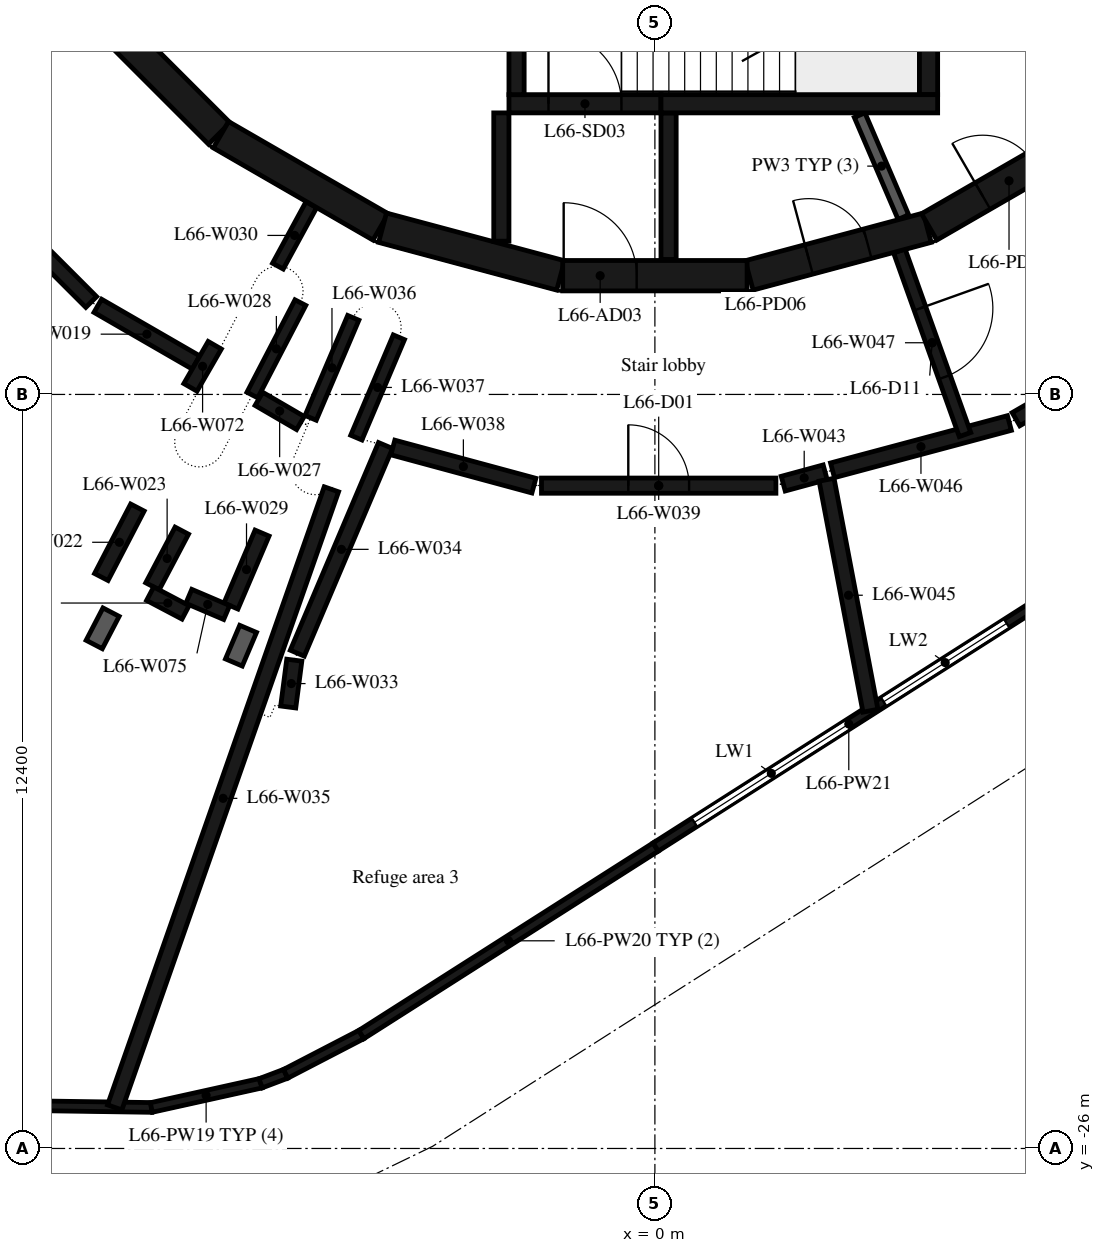
"""IFC4 building model, lengths in metres.
Left out: names, types, materials, properties, quantities, classifications, styles, units other than length and angle.
Written with IfcOpenShell. Run it as: python <this file> out.ifc"""

import sys

from ifc_helpers import new_model, si_unit, direction, frame, frame_2d, origin, place, context, subcontext, project, spatial, rectangle, extrude, element, fill, save


model = new_model("IFC4")
c1 = context("Model", 3, precision=1e-05, world=origin(), true_north=direction((0.0, 1.0)))
c2 = subcontext(c1, "Body", "Model", "MODEL_VIEW")
j1 = project(units=[si_unit("LENGTHUNIT", "METRE"), si_unit("PLANEANGLEUNIT", "RADIAN")], contexts=[c1])
p1 = place(None, origin())
s1 = spatial("IfcSite", under=j1, at=p1, CompositionType="ELEMENT")
p2 = place(p1, origin())
s2 = spatial("IfcBuilding", under=s1, at=p2, CompositionType="ELEMENT")
p3 = place(p2, frame((0.0, 0.0, 258.2)))
s3 = spatial("IfcBuildingStorey", under=s2, at=p3, CompositionType="ELEMENT", Elevation=258.2)
p4 = place(p3, frame((-10.12, -25.299, 0.0), z_axis=(0.0, 0.0, 1.0), x_axis=(0.999894413213, -0.014531428914, 0.0)))
e1 = element("IfcWall", 1, at=p4, inside=s3, PredefinedType="STANDARD", context=c2, shape_type="SweptSolid", body=[
    extrude(rectangle(XDim=1.848, YDim=0.16, at=frame_2d((0.924, 0.0))), origin(), (0.0, 0.0, 1.0), 4.75),
])
p5 = place(p3, frame((-8.281, -25.326, 0.0), z_axis=(0.0, 0.0, 1.0), x_axis=(0.976289627281, 0.216468389524, 0.0)))
e2 = element("IfcWall", 2, at=p5, inside=s3, PredefinedType="STANDARD", context=c2, shape_type="SweptSolid", body=[
    extrude(rectangle(XDim=1.846, YDim=0.16, at=frame_2d((0.923, 0.0))), origin(), (0.0, 0.0, 1.0), 4.75),
])
p6 = place(p3, frame((-6.484, -24.928, 0.0), z_axis=(0.0, 0.0, 1.0), x_axis=(0.93530111793, 0.353852820815, 0.0)))
e3 = element("IfcWall", 3, at=p6, inside=s3, PredefinedType="STANDARD", context=c2, shape_type="SweptSolid", body=[
    extrude(rectangle(XDim=0.441, YDim=0.16, at=frame_2d((0.22, 0.0))), origin(), (0.0, 0.0, 1.0), 4.75),
])
p7 = place(p3, frame((-6.072, -24.772, 0.0), z_axis=(0.0, 0.0, 1.0), x_axis=(0.887654565079, 0.460509905533, 0.0)))
e4 = element("IfcWall", 4, at=p7, inside=s3, PredefinedType="STANDARD", context=c2, shape_type="SweptSolid", body=[
    extrude(rectangle(XDim=1.405, YDim=0.16, at=frame_2d((0.702, 0.0))), origin(), (0.0, 0.0, 1.0), 4.75),
])
p8 = place(p3, frame((-4.828, -24.127, 0.0), z_axis=(0.0, 0.0, 1.0), x_axis=(0.843393436183, 0.537296484079, 0.0)))
e5 = element("IfcWall", 5, at=p8, inside=s3, PredefinedType="STANDARD", context=c2, shape_type="SweptSolid", body=[
    extrude(rectangle(XDim=5.74, YDim=0.16, at=frame_2d((2.87, 0.0))), origin(), (0.0, 0.0, 1.0), 4.75),
])
p9 = place(p3, frame((0.013, -21.043, 0.0), z_axis=(0.0, 0.0, 1.0), x_axis=(0.843393042763, 0.537297101629, 0.0)))
e6 = element("IfcWall", 6, at=p9, inside=s3, PredefinedType="STANDARD", context=c2, shape_type="SweptSolid", body=[
    extrude(rectangle(XDim=7.53, YDim=0.16, at=frame_2d((3.765, 0.0))), origin(), (0.0, 0.0, 1.0), 4.75),
])
p10 = place(p9, frame((0.755, 0.0, 1.0)))
e7 = element("IfcOpeningElement", 7, at=p10, cuts=e6, PredefinedType="OPENING", context=c2, shape_type="SweptSolid", body=[
    extrude(rectangle(XDim=3.0, YDim=2.2, at=frame_2d((1.5, 1.1))), frame((0.0, 0.09, 0.0), z_axis=(0.0, -1.0, 0.0), x_axis=(1.0, 0.0, 0.0)), (0.0, 0.0, 1.0), 0.18),
])
p11 = place(p9, frame((4.445, 0.0, 1.0)))
e8 = element("IfcOpeningElement", 8, at=p11, cuts=e6, PredefinedType="OPENING", context=c2, shape_type="SweptSolid", body=[
    extrude(rectangle(XDim=2.4, YDim=2.2, at=frame_2d((1.2, 1.1))), frame((0.0, 0.09, 0.0), z_axis=(0.0, -1.0, 0.0), x_axis=(1.0, 0.0, 0.0)), (0.0, 0.0, 1.0), 0.18),
])
p12 = place(p3, frame((1.55, -11.643, 0.0), z_axis=(0.0, 0.0, 1.0), x_axis=(0.965948410781, 0.258734743916, 0.0)))
e9 = element("IfcWall", 9, at=p12, inside=s3, PredefinedType="SHEAR", context=c2, shape_type="SweptSolid", body=[
    extrude(rectangle(XDim=3.033, YDim=0.5, at=frame_2d((1.516, 0.0))), origin(), (0.0, 0.0, 1.0), 4.75),
])
p13 = place(p12, frame((1.016, 0.0, 0.0)))
e10 = element("IfcOpeningElement", 10, at=p13, cuts=e9, PredefinedType="OPENING", context=c2, shape_type="SweptSolid", body=[
    extrude(rectangle(XDim=1.0, YDim=2.4, at=frame_2d((0.5, 1.2))), frame((0.0, 0.26, 0.0), z_axis=(0.0, -1.0, 0.0), x_axis=(1.0, 0.0, 0.0)), (0.0, 0.0, 1.0), 0.52),
])
p14 = place(p3, frame((4.51, -10.845, 0.0), z_axis=(0.0, 0.0, 1.0), x_axis=(0.865975092491, 0.500087131594, 0.0)))
e11 = element("IfcWall", 11, at=p14, inside=s3, PredefinedType="SHEAR", context=c2, shape_type="SweptSolid", body=[
    extrude(rectangle(XDim=3.033, YDim=0.5, at=frame_2d((1.516, 0.0))), origin(), (0.0, 0.0, 1.0), 4.75),
])
p15 = place(p14, frame((1.016, 0.0, 0.0)))
e12 = element("IfcOpeningElement", 12, at=p15, cuts=e11, PredefinedType="OPENING", context=c2, shape_type="SweptSolid", body=[
    extrude(rectangle(XDim=1.0, YDim=2.4, at=frame_2d((0.5, 1.2))), frame((0.0, 0.26, 0.0), z_axis=(0.0, -1.0, 0.0), x_axis=(1.0, 0.0, 0.0)), (0.0, 0.0, 1.0), 0.52),
])
p16 = place(p3, frame((-9.308, -7.164, 0.0), z_axis=(0.0, 0.0, 1.0), x_axis=(0.707106781187, -0.707106781187, 0.0)))
e13 = element("IfcWall", 13, at=p16, inside=s3, PredefinedType="SHEAR", context=c2, shape_type="SweptSolid", body=[
    extrude(rectangle(XDim=3.032, YDim=0.5, at=frame_2d((1.516, 0.0))), origin(), (0.0, 0.0, 1.0), 4.75),
])
for number, where, z_axis, x_axis in (
    (14, (-7.137, -9.329, 0.0), (0.0, 0.0, 1.0), (0.866, -0.5, 0.0)),
    (15, (-4.479, -10.858, 0.0), (0.0, 0.0, 1.0), (0.966, -0.259, 0.0)),
):
    element("IfcWall", number, at=place(p3, frame(where, z_axis=z_axis, x_axis=x_axis)), inside=s3, PredefinedType="SHEAR", context=c2, shape_type="SweptSolid", body=[
        extrude(rectangle(XDim=3.033, YDim=0.5, at=frame_2d((1.516, 0.0))), origin(), (0.0, 0.0, 1.0), 4.75),
    ])
p17 = place(p3, frame((-1.516, -11.647, 0.0), z_axis=(0.0, 0.0, 1.0), x_axis=(1.0, 0.0, 0.0)))
e16 = element("IfcWall", 16, at=p17, inside=s3, PredefinedType="SHEAR", context=c2, shape_type="SweptSolid", body=[
    extrude(rectangle(XDim=3.033, YDim=0.5, at=frame_2d((1.516, 0.0))), origin(), (0.0, 0.0, 1.0), 4.75),
])
p18 = place(p17, frame((0.016, 0.0, 0.0)))
e17 = element("IfcOpeningElement", 17, at=p18, cuts=e16, PredefinedType="OPENING", context=c2, shape_type="SweptSolid", body=[
    extrude(rectangle(XDim=1.2, YDim=2.1, at=frame_2d((0.6, 1.05))), frame((0.0, 0.26, 0.0), z_axis=(0.0, -1.0, 0.0), x_axis=(1.0, 0.0, 0.0)), (0.0, 0.0, 1.0), 0.52),
])
p19 = place(p3, frame((-2.275, -8.67, 0.0), z_axis=(0.0, 0.0, 1.0), x_axis=(0.0, 1.0, 0.0)))
e18 = element("IfcWall", 18, at=p19, inside=s3, PredefinedType="SHEAR", context=c2, shape_type="SweptSolid", body=[
    extrude(rectangle(XDim=3.32, YDim=0.25, at=frame_2d((1.66, 0.0))), origin(), (0.0, 0.0, 1.0), 4.75),
])
p20 = place(p3, frame((4.5, -8.67, 0.0), z_axis=(0.0, 0.0, 1.0), x_axis=(0.0, 1.0, 0.0)))
e19 = element("IfcWall", 19, at=p20, inside=s3, PredefinedType="SHEAR", context=c2, shape_type="SweptSolid", body=[
    extrude(rectangle(XDim=3.32, YDim=0.3, at=frame_2d((1.66, 0.0))), origin(), (0.0, 0.0, 1.0), 4.75),
])
p21 = place(p3, frame((0.1, -8.82, 0.0), z_axis=(0.0, 0.0, 1.0), x_axis=(1.0, 0.0, 0.0)))
e20 = element("IfcWall", 20, at=p21, inside=s3, PredefinedType="SHEAR", context=c2, shape_type="SweptSolid", body=[
    extrude(rectangle(XDim=4.55, YDim=0.3, at=frame_2d((2.275, 0.0))), origin(), (0.0, 0.0, 1.0), 4.75),
])
p22 = place(p3, frame((-2.4, -8.82, 0.0), z_axis=(0.0, 0.0, 1.0), x_axis=(1.0, 0.0, 0.0)))
e21 = element("IfcWall", 21, at=p22, inside=s3, PredefinedType="SHEAR", context=c2, shape_type="SweptSolid", body=[
    extrude(rectangle(XDim=2.5, YDim=0.3, at=frame_2d((1.25, 0.0))), origin(), (0.0, 0.0, 1.0), 4.75),
])
p23 = place(p22, frame((0.65, 0.0, 0.0)))
e22 = element("IfcOpeningElement", 22, at=p23, cuts=e21, PredefinedType="OPENING", context=c2, shape_type="SweptSolid", body=[
    extrude(rectangle(XDim=1.2, YDim=2.1, at=frame_2d((0.6, 1.05))), frame((0.0, 0.16, 0.0), z_axis=(0.0, -1.0, 0.0), x_axis=(1.0, 0.0, 0.0)), (0.0, 0.0, 1.0), 0.32),
])
p24 = place(p3, frame((-2.525, -8.97, 0.0), z_axis=(0.0, 0.0, 1.0), x_axis=(0.0, -1.0, 0.0)))
e23 = element("IfcWall", 23, at=p24, inside=s3, PredefinedType="SHEAR", context=c2, shape_type="SweptSolid", body=[
    extrude(rectangle(XDim=2.11, YDim=0.25, at=frame_2d((1.055, 0.0))), origin(), (0.0, 0.0, 1.0), 4.75),
])
p25 = place(p3, frame((0.225, -8.97, 0.0), z_axis=(0.0, 0.0, 1.0), x_axis=(0.0, -1.0, 0.0)))
e24 = element("IfcWall", 24, at=p25, inside=s3, PredefinedType="SHEAR", context=c2, shape_type="SweptSolid", body=[
    extrude(rectangle(XDim=2.41, YDim=0.25, at=frame_2d((1.205, 0.0))), origin(), (0.0, 0.0, 1.0), 4.75),
])
p26 = place(p3, frame((7.842, -8.248, 0.0), z_axis=(0.0, 0.0, 1.0), x_axis=(-0.66446128181, 0.747322691329, 0.0)))
e25 = element("IfcWall", 25, at=p26, inside=s3, PredefinedType="PARTITIONING", context=c2, shape_type="SweptSolid", body=[
    extrude(rectangle(XDim=4.198, YDim=0.19, at=frame_2d((2.099, 0.0))), origin(), (0.0, 0.0, 1.0), 4.75),
])
p27 = place(p3, frame((3.367, -9.007, 0.0), z_axis=(0.0, 0.0, 1.0), x_axis=(0.394387482265, -0.918944238696, 0.0)))
e26 = element("IfcWall", 26, at=p27, inside=s3, PredefinedType="PARTITIONING", context=c2, shape_type="SweptSolid", body=[
    extrude(rectangle(XDim=1.825, YDim=0.19, at=frame_2d((0.913, 0.0))), origin(), (0.0, 0.0, 1.0), 4.75),
])
p28 = place(p3, frame((-11.992, -9.358, 0.0), z_axis=(0.0, 0.0, 1.0), x_axis=(0.707106781187, -0.707106781187, 0.0)))
e27 = element("IfcWall", 27, at=p28, inside=s3, PredefinedType="PARTITIONING", context=c2, shape_type="SweptSolid", body=[
    extrude(rectangle(XDim=3.849, YDim=0.25, at=frame_2d((1.925, 0.0))), origin(), (0.0, 0.0, 1.0), 4.75),
])
p29 = place(p28, frame((1.425, 0.0, 0.0)))
e28 = element("IfcOpeningElement", 28, at=p29, cuts=e27, PredefinedType="OPENING", context=c2, shape_type="SweptSolid", body=[
    extrude(rectangle(XDim=1.0, YDim=2.1, at=frame_2d((0.5, 1.05))), frame((0.0, 0.135, 0.0), z_axis=(0.0, -1.0, 0.0), x_axis=(1.0, 0.0, 0.0)), (0.0, 0.0, 1.0), 0.27),
])
p30 = place(p3, frame((-9.162, -12.143, 0.0), z_axis=(0.0, 0.0, 1.0), x_axis=(0.866067878235, -0.499926424876, 0.0)))
e29 = element("IfcWall", 29, at=p30, inside=s3, PredefinedType="PARTITIONING", context=c2, shape_type="SweptSolid", body=[
    extrude(rectangle(XDim=1.865, YDim=0.25, at=frame_2d((0.933, 0.0))), origin(), (0.0, 0.0, 1.0), 4.75),
])
p31 = place(p3, frame((-8.51, -15.46, 0.0), z_axis=(0.0, 0.0, 1.0), x_axis=(-0.461191515673, -0.887300617531, 0.0)))
e30 = element("IfcWall", 30, at=p31, inside=s3, PredefinedType="PARTITIONING", context=c2, shape_type="SweptSolid", body=[
    extrude(rectangle(XDim=1.287, YDim=0.25, at=frame_2d((0.644, 0.0))), origin(), (0.0, 0.0, 1.0), 4.75),
])
p32 = place(p3, frame((-8.263, -16.755, 0.0), z_axis=(0.0, 0.0, 1.0), x_axis=(0.466640728882, 0.884446962881, 0.0)))
e31 = element("IfcWall", 31, at=p32, inside=s3, PredefinedType="PARTITIONING", context=c2, shape_type="SweptSolid", body=[
    extrude(rectangle(XDim=1.035, YDim=0.25, at=frame_2d((0.518, 0.0))), origin(), (0.0, 0.0, 1.0), 4.75),
])
p33 = place(p3, frame((-6.512, -13.673, 0.0), z_axis=(0.0, 0.0, 1.0), x_axis=(0.864081706907, -0.503351570762, 0.0)))
e32 = element("IfcWall", 32, at=p33, inside=s3, PredefinedType="PARTITIONING", context=c2, shape_type="SweptSolid", body=[
    extrude(rectangle(XDim=0.789, YDim=0.25, at=frame_2d((0.395, 0.0))), origin(), (0.0, 0.0, 1.0), 4.75),
])
p34 = place(p3, frame((-6.62, -13.61, 0.0), z_axis=(0.0, 0.0, 1.0), x_axis=(0.461182211336, 0.887305453577, 0.0)))
e33 = element("IfcWall", 33, at=p34, inside=s3, PredefinedType="PARTITIONING", context=c2, shape_type="SweptSolid", body=[
    extrude(rectangle(XDim=1.713, YDim=0.2, at=frame_2d((0.856, 0.0))), origin(), (0.0, 0.0, 1.0), 4.75),
])
p35 = place(p3, frame((-6.46, -15.88, 0.0), z_axis=(0.0, 0.0, 1.0), x_axis=(-0.39236059396, -0.919811483027, 0.0)))
e34 = element("IfcWall", 34, at=p35, inside=s3, PredefinedType="PARTITIONING", context=c2, shape_type="SweptSolid", body=[
    extrude(rectangle(XDim=1.305, YDim=0.25, at=frame_2d((0.652, 0.0))), origin(), (0.0, 0.0, 1.0), 4.75),
])
p36 = place(p3, frame((-6.2, -11.49, 0.0), z_axis=(0.0, 0.0, 1.0), x_axis=(0.478271968214, 0.878211776521, 0.0)))
e35 = element("IfcWall", 35, at=p36, inside=s3, PredefinedType="PARTITIONING", context=c2, shape_type="SweptSolid", body=[
    extrude(rectangle(XDim=1.15, YDim=0.2, at=frame_2d((0.575, 0.0))), origin(), (0.0, 0.0, 1.0), 4.75),
])
p37 = place(p3, frame((-6.03, -18.74, 0.0), z_axis=(0.0, 0.0, 1.0), x_axis=(0.128909046511, 0.99165642121, 0.0)))
e36 = element("IfcWall", 36, at=p37, inside=s3, PredefinedType="PARTITIONING", context=c2, shape_type="SweptSolid", body=[
    extrude(rectangle(XDim=0.777, YDim=0.25, at=frame_2d((0.388, 0.0))), origin(), (0.0, 0.0, 1.0), 4.75),
])
p38 = place(p3, frame((-5.881, -17.855, 0.0), z_axis=(0.0, 0.0, 1.0), x_axis=(0.391090483061, 0.920352233691, 0.0)))
e37 = element("IfcWall", 37, at=p38, inside=s3, PredefinedType="PARTITIONING", context=c2, shape_type="SweptSolid", body=[
    extrude(rectangle(XDim=3.711, YDim=0.25, at=frame_2d((1.855, 0.0))), origin(), (0.0, 0.0, 1.0), 4.75),
])
p39 = place(p3, frame((-5.32, -15.16, 0.0), z_axis=(0.0, 0.0, 1.0), x_axis=(-0.330837024338, -0.94368790568, 0.0)))
e38 = element("IfcWall", 38, at=p39, inside=s3, PredefinedType="PARTITIONING", context=c2, shape_type="SweptSolid", body=[
    extrude(rectangle(XDim=10.771, YDim=0.25, at=frame_2d((5.385, 0.0))), origin(), (0.0, 0.0, 1.0), 4.75),
])
p40 = place(p3, frame((-4.96, -12.34, 0.0), z_axis=(0.0, 0.0, 1.0), x_axis=(-0.391990471088, -0.919969276974, 0.0)))
e39 = element("IfcWall", 39, at=p40, inside=s3, PredefinedType="PARTITIONING", context=c2, shape_type="SweptSolid", body=[
    extrude(rectangle(XDim=1.788, YDim=0.2, at=frame_2d((0.894, 0.0))), origin(), (0.0, 0.0, 1.0), 4.75),
])
p41 = place(p3, frame((-4.91, -14.31, 0.0), z_axis=(0.0, 0.0, 1.0), x_axis=(0.390497378465, 0.920604039429, 0.0)))
e40 = element("IfcWall", 40, at=p41, inside=s3, PredefinedType="PARTITIONING", context=c2, shape_type="SweptSolid", body=[
    extrude(rectangle(XDim=1.792, YDim=0.2, at=frame_2d((0.896, 0.0))), origin(), (0.0, 0.0, 1.0), 4.75),
])
p42 = place(p3, frame((-4.309, -14.473, 0.0), z_axis=(0.0, 0.0, 1.0), x_axis=(0.965301112602, -0.26113935362, 0.0)))
e41 = element("IfcWall", 41, at=p42, inside=s3, PredefinedType="PARTITIONING", context=c2, shape_type="SweptSolid", body=[
    extrude(rectangle(XDim=2.403, YDim=0.25, at=frame_2d((1.201, 0.0))), origin(), (0.0, 0.0, 1.0), 4.75),
])
p43 = place(p3, frame((-1.865, -15.1, 0.0), z_axis=(0.0, 0.0, 1.0), x_axis=(1.0, 0.0, 0.0)))
e42 = element("IfcWall", 42, at=p43, inside=s3, PredefinedType="PARTITIONING", context=c2, shape_type="SweptSolid", body=[
    extrude(rectangle(XDim=3.855, YDim=0.25, at=frame_2d((1.927, 0.0))), origin(), (0.0, 0.0, 1.0), 4.75),
])
p44 = place(p43, frame((1.427, 0.0, 0.0)))
e43 = element("IfcOpeningElement", 43, at=p44, cuts=e42, PredefinedType="OPENING", context=c2, shape_type="SweptSolid", body=[
    extrude(rectangle(XDim=1.0, YDim=2.1, at=frame_2d((0.5, 1.05))), frame((0.0, 0.135, 0.0), z_axis=(0.0, -1.0, 0.0), x_axis=(1.0, 0.0, 0.0)), (0.0, 0.0, 1.0), 0.27),
])
p45 = place(p3, frame((2.111, -15.067, 0.0), z_axis=(0.0, 0.0, 1.0), x_axis=(0.965039301335, 0.262105221007, 0.0)))
e44 = element("IfcWall", 44, at=p45, inside=s3, PredefinedType="PARTITIONING", context=c2, shape_type="SweptSolid", body=[
    extrude(rectangle(XDim=0.714, YDim=0.25, at=frame_2d((0.357, 0.0))), origin(), (0.0, 0.0, 1.0), 4.75),
])
p46 = place(p3, frame((2.823, -15.003, 0.0), z_axis=(0.0, 0.0, 1.0), x_axis=(0.18669720821, -0.982417504143, 0.0)))
e45 = element("IfcWall", 45, at=p46, inside=s3, PredefinedType="PARTITIONING", context=c2, shape_type="SweptSolid", body=[
    extrude(rectangle(XDim=3.867, YDim=0.25, at=frame_2d((1.933, 0.0))), origin(), (0.0, 0.0, 1.0), 4.75),
])
p47 = place(p3, frame((2.921, -14.848, 0.0), z_axis=(0.0, 0.0, 1.0), x_axis=(0.966090816863, 0.258202504969, 0.0)))
e46 = element("IfcWall", 46, at=p47, inside=s3, PredefinedType="PARTITIONING", context=c2, shape_type="SweptSolid", body=[
    extrude(rectangle(XDim=3.011, YDim=0.25, at=frame_2d((1.506, 0.0))), origin(), (0.0, 0.0, 1.0), 4.75),
])
p48 = place(p3, frame((4.02, -11.24, 0.0), z_axis=(0.0, 0.0, 1.0), x_axis=(0.336751058688, -0.941593715183, 0.0)))
e47 = element("IfcWall", 47, at=p48, inside=s3, PredefinedType="PARTITIONING", context=c2, shape_type="SweptSolid", body=[
    extrude(rectangle(XDim=3.207, YDim=0.2, at=frame_2d((1.604, 0.0))), origin(), (0.0, 0.0, 1.0), 4.75),
])
p49 = place(p48, frame((1.004, 0.0, 0.0)))
e48 = element("IfcOpeningElement", 48, at=p49, cuts=e47, PredefinedType="OPENING", context=c2, shape_type="SweptSolid", body=[
    extrude(rectangle(XDim=1.2, YDim=2.1, at=frame_2d((0.6, 1.05))), frame((0.0, 0.11, 0.0), z_axis=(0.0, -1.0, 0.0), x_axis=(1.0, 0.0, 0.0)), (0.0, 0.0, 1.0), 0.22),
])
p50 = place(p3, frame((5.938, -14.007, 0.0), z_axis=(0.0, 0.0, 1.0), x_axis=(0.865615852585, 0.500708693508, 0.0)))
e49 = element("IfcWall", 49, at=p50, inside=s3, PredefinedType="PARTITIONING", context=c2, shape_type="SweptSolid", body=[
    extrude(rectangle(XDim=3.849, YDim=0.25, at=frame_2d((1.925, 0.0))), origin(), (0.0, 0.0, 1.0), 4.75),
])
p51 = place(p50, frame((1.425, 0.0, 0.0)))
e50 = element("IfcOpeningElement", 50, at=p51, cuts=e49, PredefinedType="OPENING", context=c2, shape_type="SweptSolid", body=[
    extrude(rectangle(XDim=1.0, YDim=2.1, at=frame_2d((0.5, 1.05))), frame((0.0, 0.135, 0.0), z_axis=(0.0, -1.0, 0.0), x_axis=(1.0, 0.0, 0.0)), (0.0, 0.0, 1.0), 0.27),
])
p52 = place(p3, frame((-7.638, -13.484, 0.0), z_axis=(0.0, 0.0, 1.0), x_axis=(0.499880961361, 0.866094119867, 0.0)))
e51 = element("IfcWall", 51, at=p52, inside=s3, PredefinedType="PARTITIONING", context=c2, shape_type="SweptSolid", body=[
    extrude(rectangle(XDim=0.8, YDim=0.25, at=frame_2d((0.4, 0.0))), origin(), (0.0, 0.0, 1.0), 4.75),
])
p53 = place(p3, frame((-8.301, -16.877, 0.0), z_axis=(0.0, 0.0, 1.0), x_axis=(0.884571883789, -0.466403883357, 0.0)))
e52 = element("IfcWall", 52, at=p53, inside=s3, PredefinedType="PARTITIONING", context=c2, shape_type="SweptSolid", body=[
    extrude(rectangle(XDim=0.658, YDim=0.25, at=frame_2d((0.329, 0.0))), origin(), (0.0, 0.0, 1.0), 4.75),
])
p54 = place(p3, frame((-7.665, -16.92, 0.0), z_axis=(0.0, 0.0, 1.0), x_axis=(0.919833690765, -0.392308528245, 0.0)))
e53 = element("IfcWall", 53, at=p54, inside=s3, PredefinedType="PARTITIONING", context=c2, shape_type="SweptSolid", body=[
    extrude(rectangle(XDim=0.677, YDim=0.25, at=frame_2d((0.338, 0.0))), origin(), (0.0, 0.0, 1.0), 4.75),
])
p55 = place(p10, origin())
e54 = element("IfcWindow", 54, at=p55, inside=s3, PartitioningType="SINGLE_PANEL", PredefinedType="WINDOW", context=c2, shape_type="SweptSolid", body=[
    extrude(rectangle(XDim=3.0, YDim=2.2, at=frame_2d((1.5, 1.1))), frame((0.0, 0.03, 0.0), z_axis=(0.0, -1.0, 0.0), x_axis=(1.0, 0.0, 0.0)), (0.0, 0.0, 1.0), 0.06),
])
fill(e7, e54)
p56 = place(p11, origin())
e55 = element("IfcWindow", 55, at=p56, inside=s3, PartitioningType="SINGLE_PANEL", PredefinedType="WINDOW", context=c2, shape_type="SweptSolid", body=[
    extrude(rectangle(XDim=2.4, YDim=2.2, at=frame_2d((1.2, 1.1))), frame((0.0, 0.03, 0.0), z_axis=(0.0, -1.0, 0.0), x_axis=(1.0, 0.0, 0.0)), (0.0, 0.0, 1.0), 0.06),
])
fill(e8, e55)
p57 = place(p23, origin())
e56 = element("IfcDoor", 56, at=p57, inside=s3, OperationType="SINGLE_SWING_LEFT", PredefinedType="DOOR", context=c2, shape_type="SweptSolid", body=[
    extrude(rectangle(XDim=1.2, YDim=2.1, at=frame_2d((0.6, 1.05))), frame((0.0, 0.025, 0.0), z_axis=(0.0, -1.0, 0.0), x_axis=(1.0, 0.0, 0.0)), (0.0, 0.0, 1.0), 0.05),
])
fill(e22, e56)
p58 = place(p18, origin())
e57 = element("IfcDoor", 57, at=p58, inside=s3, OperationType="SINGLE_SWING_RIGHT", PredefinedType="DOOR", context=c2, shape_type="SweptSolid", body=[
    extrude(rectangle(XDim=1.2, YDim=2.1, at=frame_2d((0.6, 1.05))), frame((0.0, 0.025, 0.0), z_axis=(0.0, -1.0, 0.0), x_axis=(1.0, 0.0, 0.0)), (0.0, 0.0, 1.0), 0.05),
])
fill(e17, e57)
p59 = place(p13, origin())
e58 = element("IfcDoor", 58, at=p59, inside=s3, OperationType="SINGLE_SWING_RIGHT", PredefinedType="DOOR", context=c2, shape_type="SweptSolid", body=[
    extrude(rectangle(XDim=1.0, YDim=2.4, at=frame_2d((0.5, 1.2))), frame((0.0, 0.025, 0.0), z_axis=(0.0, -1.0, 0.0), x_axis=(1.0, 0.0, 0.0)), (0.0, 0.0, 1.0), 0.05),
])
fill(e10, e58)
p60 = place(p15, origin())
e59 = element("IfcDoor", 59, at=p60, inside=s3, OperationType="SINGLE_SWING_LEFT", PredefinedType="DOOR", context=c2, shape_type="SweptSolid", body=[
    extrude(rectangle(XDim=1.0, YDim=2.4, at=frame_2d((0.5, 1.2))), frame((0.0, 0.025, 0.0), z_axis=(0.0, -1.0, 0.0), x_axis=(1.0, 0.0, 0.0)), (0.0, 0.0, 1.0), 0.05),
])
fill(e12, e59)
p61 = place(p44, origin())
e60 = element("IfcDoor", 60, at=p61, inside=s3, OperationType="SINGLE_SWING_LEFT", PredefinedType="DOOR", context=c2, shape_type="SweptSolid", body=[
    extrude(rectangle(XDim=1.0, YDim=2.1, at=frame_2d((0.5, 1.05))), frame((0.0, 0.025, 0.0), z_axis=(0.0, -1.0, 0.0), x_axis=(1.0, 0.0, 0.0)), (0.0, 0.0, 1.0), 0.05),
])
fill(e43, e60)
p62 = place(p49, origin())
e61 = element("IfcDoor", 61, at=p62, inside=s3, OperationType="SINGLE_SWING_LEFT", PredefinedType="DOOR", context=c2, shape_type="SweptSolid", body=[
    extrude(rectangle(XDim=1.2, YDim=2.1, at=frame_2d((0.6, 1.05))), frame((0.0, 0.025, 0.0), z_axis=(0.0, -1.0, 0.0), x_axis=(1.0, 0.0, 0.0)), (0.0, 0.0, 1.0), 0.05),
])
fill(e48, e61)
save(model, sys.argv[1])
